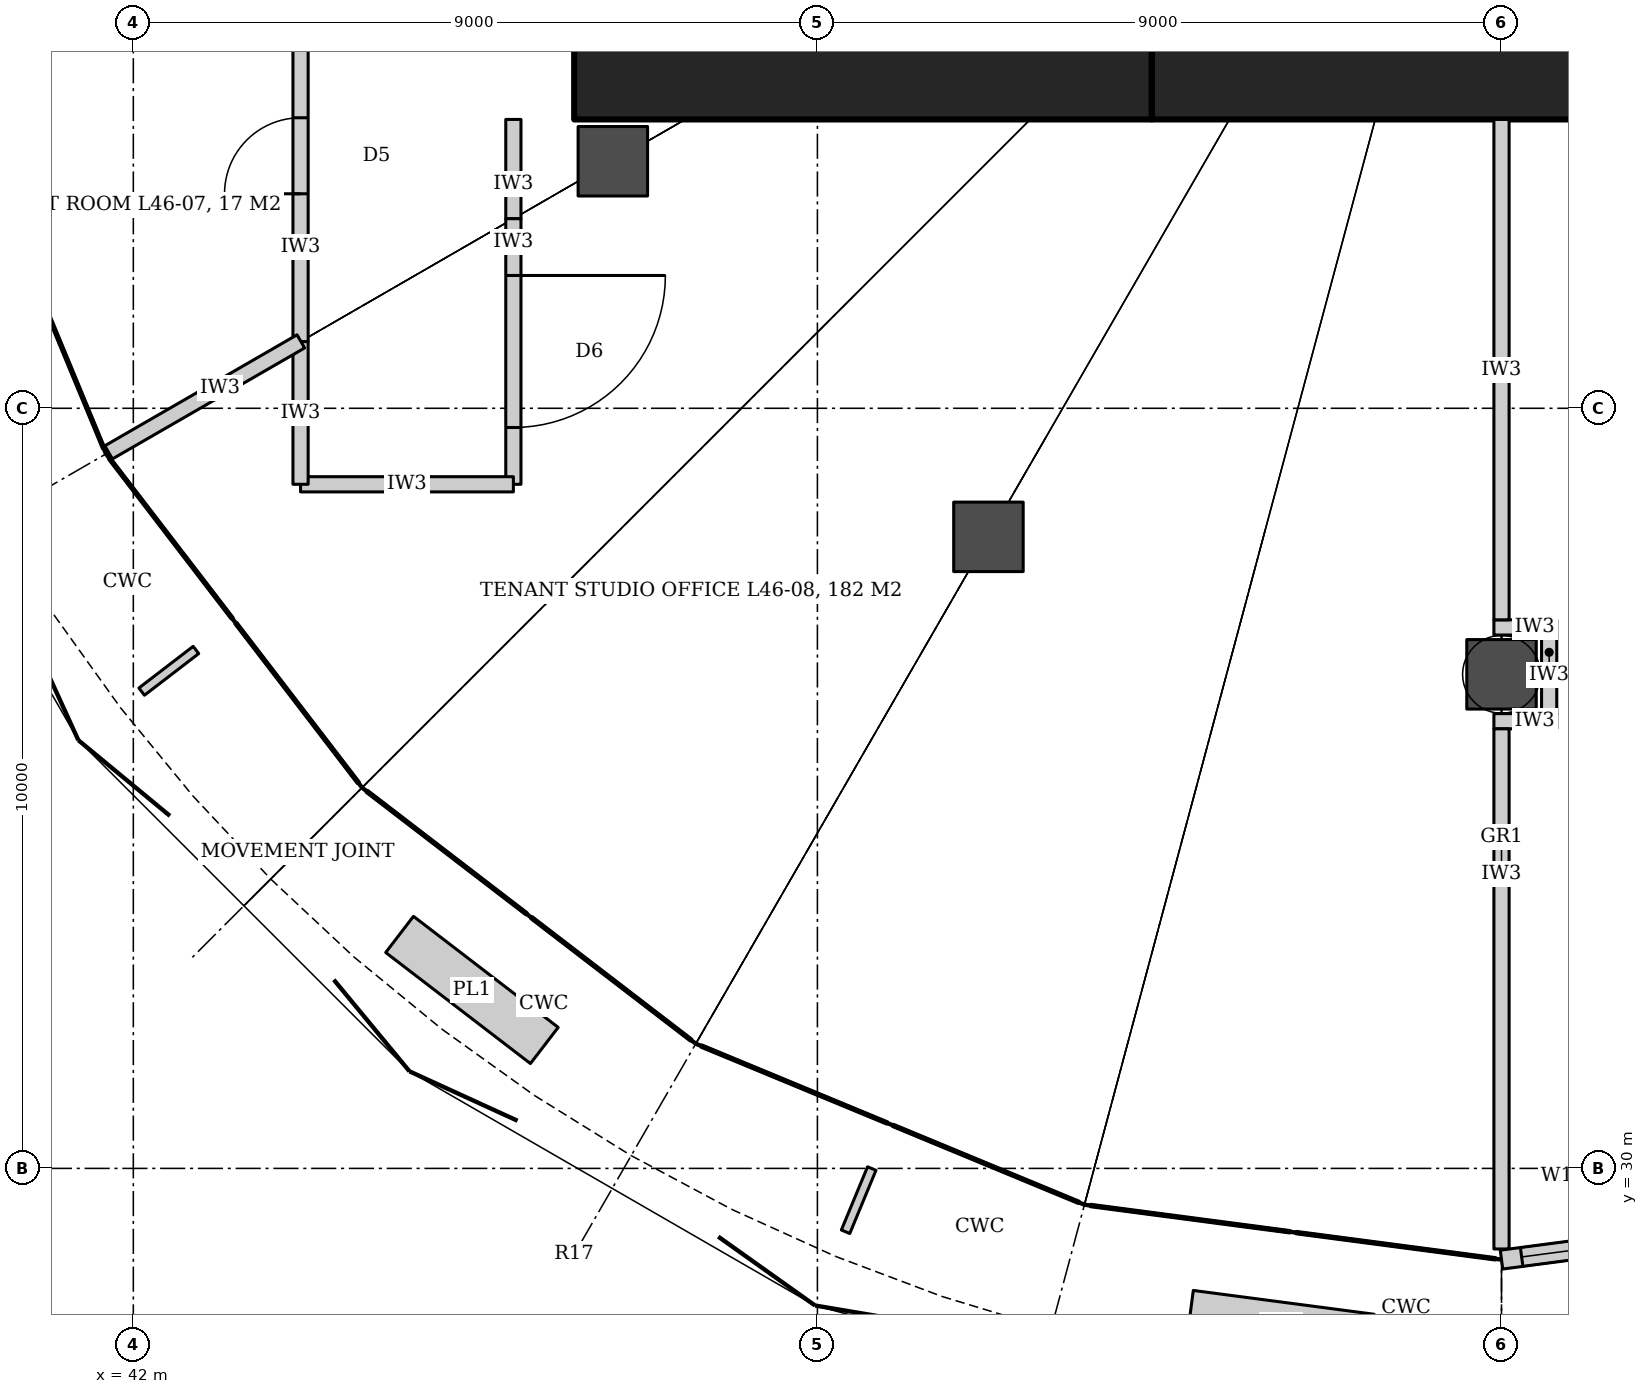
"""IFC4 building model, lengths in metres.
Left out: names, types, materials, properties, quantities, classifications, styles, units other than length and angle.
Written with IfcOpenShell. Run it as: python <this file> out.ifc"""

import sys

from ifc_helpers import new_model, si_unit, direction, frame, frame_2d, origin, origin_2d, place, context, subcontext, project, spatial, rectangle, hollow_circle, extrude, element, fill, save


model = new_model("IFC4")
c1 = context("Model", 3, precision=1e-05, world=origin(), true_north=direction((0.0, 1.0)))
c2 = subcontext(c1, "Body", "Model", "MODEL_VIEW")
j1 = project(units=[si_unit("LENGTHUNIT", "METRE"), si_unit("PLANEANGLEUNIT", "RADIAN")], contexts=[c1])
p1 = place(None, origin())
s1 = spatial("IfcSite", under=j1, at=p1, CompositionType="ELEMENT")
p2 = place(p1, origin())
s2 = spatial("IfcBuilding", under=s1, at=p2, CompositionType="ELEMENT")
p3 = place(p2, frame((0.0, 0.0, 202.4)))
s3 = spatial("IfcBuildingStorey", under=s2, at=p3, CompositionType="ELEMENT", Elevation=202.4)
p4 = place(p3, frame((47.8, 44.55, 0.0), z_axis=(0.0, 0.0, 1.0), x_axis=(1.0, 0.0, 0.0)))
e1 = element("IfcWall", 1, at=p4, inside=s3, PredefinedType="SHEAR", context=c2, shape_type="SweptSolid", body=[
    extrude(rectangle(XDim=7.6, YDim=1.5, at=frame_2d((3.8, 0.0))), origin(), (0.0, 0.0, 1.0), 4.2),
])
p5 = place(p3, frame((55.4, 44.55, 0.0), z_axis=(0.0, 0.0, 1.0), x_axis=(1.0, 0.0, 0.0)))
e2 = element("IfcWall", 2, at=p5, inside=s3, PredefinedType="SHEAR", context=c2, shape_type="SweptSolid", body=[
    extrude(rectangle(XDim=9.2, YDim=1.5, at=frame_2d((4.6, 0.0))), origin(), (0.0, 0.0, 1.0), 4.2),
])
for number, where, z_axis, x_axis in (
    (3, (48.309, 43.25, 0.0), (0.0, 0.0, 1.0), (1.0, 0.0, 0.0)),
    (4, (53.25, 38.309, 0.0), (0.0, 0.0, 1.0), (1.0, 0.0, 0.0)),
    (5, (60.0, 36.5, 0.0), (0.0, 0.0, 1.0), (1.0, 0.0, 0.0)),
):
    element("IfcColumn", number, at=place(p3, frame(where, z_axis=z_axis, x_axis=x_axis)), inside=s3, PredefinedType="COLUMN", context=c2, shape_type="SweptSolid", body=[
        extrude(hollow_circle(Radius=0.457, WallThickness=0.045, at=origin_2d()), origin(), (0.0, 0.0, 1.0), 4.2),
    ])
p6 = place(p3, frame((47.0, 43.8, 0.0), z_axis=(0.0, 0.0, 1.0), x_axis=(0.0, -1.0, 0.0)))
e6 = element("IfcWall", 6, at=p6, inside=s3, PredefinedType="PARTITIONING", context=c2, shape_type="SweptSolid", body=[
    extrude(rectangle(XDim=1.306, YDim=0.2, at=frame_2d((0.653, 0.0))), origin(), (0.0, 0.0, 1.0), 3.012),
])
p7 = place(p3, frame((47.0, 42.494, 0.0), z_axis=(0.0, 0.0, 1.0), x_axis=(0.0, -1.0, 0.0)))
e7 = element("IfcWall", 7, at=p7, inside=s3, PredefinedType="PARTITIONING", context=c2, shape_type="SweptSolid", body=[
    extrude(rectangle(XDim=3.494, YDim=0.2, at=frame_2d((1.747, 0.0))), origin(), (0.0, 0.0, 1.0), 3.012),
])
p8 = place(p7, frame((0.747, 0.0, 0.0)))
e8 = element("IfcOpeningElement", 8, at=p8, cuts=e7, PredefinedType="OPENING", context=c2, shape_type="SweptSolid", body=[
    extrude(rectangle(XDim=2.0, YDim=2.1, at=frame_2d((1.0, 1.05))), frame((0.0, 0.11, 0.0), z_axis=(0.0, -1.0, 0.0), x_axis=(1.0, 0.0, 0.0)), (0.0, 0.0, 1.0), 0.22),
])
p9 = place(p3, frame((47.0, 39.0, 0.0), z_axis=(0.0, 0.0, 1.0), x_axis=(-1.0, 0.0, 0.0)))
e9 = element("IfcWall", 9, at=p9, inside=s3, PredefinedType="PARTITIONING", context=c2, shape_type="SweptSolid", body=[
    extrude(rectangle(XDim=2.8, YDim=0.2, at=frame_2d((1.4, 0.0))), origin(), (0.0, 0.0, 1.0), 3.04),
])
p10 = place(p3, frame((44.2, 39.0, 0.0), z_axis=(0.0, 0.0, 1.0), x_axis=(0.0, 1.0, 0.0)))
e10 = element("IfcWall", 10, at=p10, inside=s3, PredefinedType="PARTITIONING", context=c2, shape_type="SweptSolid", body=[
    extrude(rectangle(XDim=1.878, YDim=0.2, at=frame_2d((0.939, 0.0))), origin(), (0.0, 0.0, 1.0), 3.012),
])
p11 = place(p3, frame((44.2, 40.878, 0.0), z_axis=(0.0, 0.0, 1.0), x_axis=(0.0, 1.0, 0.0)))
e11 = element("IfcWall", 11, at=p11, inside=s3, PredefinedType="PARTITIONING", context=c2, shape_type="SweptSolid", body=[
    extrude(rectangle(XDim=4.888, YDim=0.2, at=frame_2d((2.444, 0.0))), origin(), (0.0, 0.0, 1.0), 3.012),
])
p12 = place(p11, frame((1.944, 0.0, 0.0)))
e12 = element("IfcOpeningElement", 12, at=p12, cuts=e11, PredefinedType="OPENING", context=c2, shape_type="SweptSolid", body=[
    extrude(rectangle(XDim=1.0, YDim=2.1, at=frame_2d((0.5, 1.05))), frame((0.0, 0.11, 0.0), z_axis=(0.0, -1.0, 0.0), x_axis=(1.0, 0.0, 0.0)), (0.0, 0.0, 1.0), 0.22),
])
p13 = place(p3, frame((44.198, 45.766, 0.0), z_axis=(0.0, 0.0, 1.0), x_axis=(-0.96593251702, -0.258794073665, 0.0)))
e13 = element("IfcWall", 13, at=p13, inside=s3, PredefinedType="PARTITIONING", context=c2, shape_type="SweptSolid", body=[
    extrude(rectangle(XDim=4.7, YDim=0.2, at=frame_2d((2.35, 0.0))), origin(), (0.0, 0.0, 1.0), 3.012),
])
p14 = place(p3, frame((44.204, 40.88, 0.0), z_axis=(0.0, 0.0, 1.0), x_axis=(-0.866032430508, -0.49998782916, 0.0)))
e14 = element("IfcWall", 14, at=p14, inside=s3, PredefinedType="PARTITIONING", context=c2, shape_type="SweptSolid", body=[
    extrude(rectangle(XDim=2.92, YDim=0.2, at=frame_2d((1.46, 0.0))), origin(), (0.0, 0.0, 1.0), 3.012),
])
for number, where, z_axis, x_axis in (
    (15, (59.9, 37.117, 0.0), (0.0, 0.0, 1.0), (1.0, 0.0, 0.0)),
    (16, (59.9, 35.883, 0.0), (0.0, 0.0, 1.0), (1.0, 0.0, 0.0)),
):
    element("IfcWall", number, at=place(p3, frame(where, z_axis=z_axis, x_axis=x_axis)), inside=s3, PredefinedType="PARTITIONING", context=c2, shape_type="SweptSolid", body=[
        extrude(rectangle(XDim=0.827, YDim=0.2, at=frame_2d((0.414, 0.0))), origin(), (0.0, 0.0, 1.0), 3.012),
    ])
p15 = place(p3, frame((60.627, 37.017, 0.0), z_axis=(0.0, 0.0, 1.0), x_axis=(0.0, -1.0, 0.0)))
e17 = element("IfcWall", 17, at=p15, inside=s3, PredefinedType="PARTITIONING", context=c2, shape_type="SweptSolid", body=[
    extrude(rectangle(XDim=1.034, YDim=0.2, at=frame_2d((0.517, 0.0))), origin(), (0.0, 0.0, 1.0), 3.012),
])
p16 = place(p3, frame((60.0, 43.8, 0.0), z_axis=(0.0, 0.0, 1.0), x_axis=(0.0, -1.0, 0.0)))
e18 = element("IfcWall", 18, at=p16, inside=s3, PredefinedType="PARTITIONING", context=c2, shape_type="SweptSolid", body=[
    extrude(rectangle(XDim=6.583, YDim=0.2, at=frame_2d((3.292, 0.0))), origin(), (0.0, 0.0, 1.0), 3.04),
])
p17 = place(p3, frame((60.0, 35.783, 0.0), z_axis=(0.0, 0.0, 1.0), x_axis=(0.0, -1.0, 0.0)))
e19 = element("IfcWall", 19, at=p17, inside=s3, PredefinedType="PARTITIONING", context=c2, shape_type="SweptSolid", body=[
    extrude(rectangle(XDim=6.843, YDim=0.2, at=frame_2d((3.421, 0.0))), origin(), (0.0, 0.0, 1.0), 3.012),
])
p18 = place(p3, frame((60.0, 28.8, 0.0), z_axis=(0.0, 0.0, 1.0), x_axis=(0.991444232742, 0.130530967061, 0.0)))
e20 = element("IfcWall", 20, at=p18, inside=s3, PredefinedType="SOLIDWALL", context=c2, shape_type="SweptSolid", body=[
    extrude(rectangle(XDim=5.534, YDim=0.25, at=frame_2d((2.767, 0.0))), origin(), (0.0, 0.0, 1.0), 4.04),
])
p19 = place(p18, frame((1.867, 0.0, 0.0)))
e21 = element("IfcOpeningElement", 21, at=p19, cuts=e20, PredefinedType="OPENING", context=c2, shape_type="SweptSolid", body=[
    extrude(rectangle(XDim=1.8, YDim=2.4, at=frame_2d((0.9, 1.2))), frame((0.0, 0.135, 0.0), z_axis=(0.0, -1.0, 0.0), x_axis=(1.0, 0.0, 0.0)), (0.0, 0.0, 1.0), 0.27),
])
p20 = place(p18, frame((0.267, 0.0, 0.0)))
e22 = element("IfcOpeningElement", 22, at=p20, cuts=e20, PredefinedType="OPENING", context=c2, shape_type="SweptSolid", body=[
    extrude(rectangle(XDim=1.2, YDim=2.4, at=frame_2d((0.6, 1.2))), frame((0.0, 0.135, 0.0), z_axis=(0.0, -1.0, 0.0), x_axis=(1.0, 0.0, 0.0)), (0.0, 0.0, 1.0), 0.27),
])
p21 = place(p18, frame((4.067, 0.0, 0.0)))
e23 = element("IfcOpeningElement", 23, at=p21, cuts=e20, PredefinedType="OPENING", context=c2, shape_type="SweptSolid", body=[
    extrude(rectangle(XDim=1.2, YDim=2.4, at=frame_2d((0.6, 1.2))), frame((0.0, 0.135, 0.0), z_axis=(0.0, -1.0, 0.0), x_axis=(1.0, 0.0, 0.0)), (0.0, 0.0, 1.0), 0.27),
])
p22 = place(p12, origin())
e24 = element("IfcDoor", 24, at=p22, inside=s3, OperationType="SINGLE_SWING_LEFT", PredefinedType="DOOR", context=c2, shape_type="SweptSolid", body=[
    extrude(rectangle(XDim=1.0, YDim=2.1, at=frame_2d((0.5, 1.05))), frame((0.0, 0.025, 0.0), z_axis=(0.0, -1.0, 0.0), x_axis=(1.0, 0.0, 0.0)), (0.0, 0.0, 1.0), 0.05),
])
fill(e12, e24)
p23 = place(p8, origin())
e25 = element("IfcDoor", 25, at=p23, inside=s3, OperationType="DOUBLE_DOOR_DOUBLE_SWING", PredefinedType="DOOR", context=c2, shape_type="SweptSolid", body=[
    extrude(rectangle(XDim=2.0, YDim=2.1, at=frame_2d((1.0, 1.05))), frame((0.0, 0.025, 0.0), z_axis=(0.0, -1.0, 0.0), x_axis=(1.0, 0.0, 0.0)), (0.0, 0.0, 1.0), 0.05),
])
fill(e8, e25)
p24 = place(p20, origin())
e26 = element("IfcWindow", 26, at=p24, inside=s3, PartitioningType="SINGLE_PANEL", PredefinedType="WINDOW", context=c2, shape_type="SweptSolid", body=[
    extrude(rectangle(XDim=1.2, YDim=2.4, at=frame_2d((0.6, 1.2))), frame((0.0, 0.03, 0.0), z_axis=(0.0, -1.0, 0.0), x_axis=(1.0, 0.0, 0.0)), (0.0, 0.0, 1.0), 0.06),
])
fill(e22, e26)
save(model, sys.argv[1])
